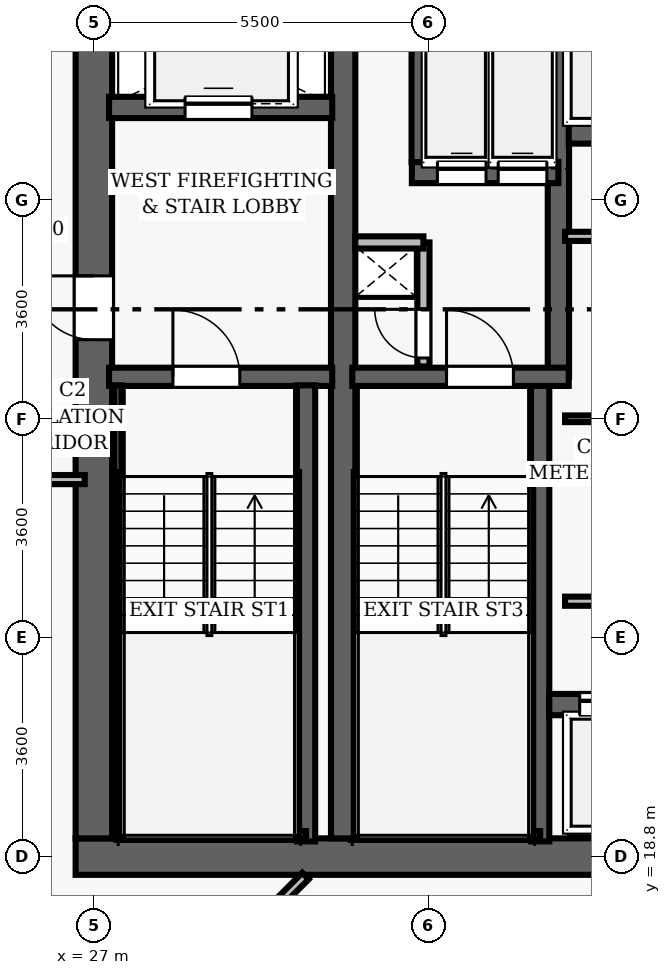
"""IFC4 building model, lengths in metres.
Left out: names, types, materials, properties, quantities, classifications, styles, units other than length and angle.
Written with IfcOpenShell. Run it as: python <this file> out.ifc"""

import sys

from ifc_helpers import new_model, si_unit, direction, frame, frame_2d, origin, place, context, subcontext, project, spatial, rectangle, extrude, element, fill, save


model = new_model("IFC4")
c1 = context("Model", 3, precision=1e-05, world=origin(), true_north=direction((0.0, 1.0)))
c2 = subcontext(c1, "Body", "Model", "MODEL_VIEW")
j1 = project(units=[si_unit("LENGTHUNIT", "METRE"), si_unit("PLANEANGLEUNIT", "RADIAN")], contexts=[c1])
p1 = place(None, origin())
s1 = spatial("IfcSite", under=j1, at=p1, CompositionType="ELEMENT")
p2 = place(p1, origin())
s2 = spatial("IfcBuilding", under=s1, at=p2, CompositionType="ELEMENT")
p3 = place(p2, frame((0.0, 0.0, 102.8)))
s3 = spatial("IfcBuildingStorey", under=s2, at=p3, CompositionType="ELEMENT", Elevation=102.8)
p4 = place(p3, frame((26.7, 18.8, 0.0), z_axis=(0.0, 0.0, 1.0), x_axis=(1.0, 0.0, 0.0)))
e1 = element("IfcWall", 1, at=p4, inside=s3, PredefinedType="SHEAR", context=c2, shape_type="SweptSolid", body=[
    extrude(rectangle(XDim=22.6, YDim=0.6, at=frame_2d((11.3, 0.0))), origin(), (0.0, 0.0, 1.0), 3.5),
])
p5 = place(p4, frame((14.52, 0.0, 0.0)))
e2 = element("IfcOpeningElement", 2, at=p5, cuts=e1, PredefinedType="OPENING", context=c2, shape_type="SweptSolid", body=[
    extrude(rectangle(XDim=1.05, YDim=2.15, at=frame_2d((0.525, 1.075))), frame((0.0, 0.31, 0.0), z_axis=(0.0, -1.0, 0.0), x_axis=(1.0, 0.0, 0.0)), (0.0, 0.0, 1.0), 0.62),
])
p6 = place(p3, frame((27.0, 19.1, 0.0), z_axis=(0.0, 0.0, 1.0), x_axis=(0.0, 1.0, 0.0)))
e3 = element("IfcWall", 3, at=p6, inside=s3, PredefinedType="SHEAR", context=c2, shape_type="SweptSolid", body=[
    extrude(rectangle(XDim=13.8, YDim=0.6, at=frame_2d((6.9, 0.0))), origin(), (0.0, 0.0, 1.0), 3.5),
])
p7 = place(p6, frame((8.2, 0.0, 0.0)))
e4 = element("IfcOpeningElement", 4, at=p7, cuts=e3, PredefinedType="OPENING", context=c2, shape_type="SweptSolid", body=[
    extrude(rectangle(XDim=1.05, YDim=2.15, at=frame_2d((0.525, 1.075))), frame((0.0, 0.31, 0.0), z_axis=(0.0, -1.0, 0.0), x_axis=(1.0, 0.0, 0.0)), (0.0, 0.0, 1.0), 0.62),
])
p8 = place(p3, frame((31.1, 19.1, 0.0), z_axis=(0.0, 0.0, 1.0), x_axis=(0.0, 1.0, 0.0)))
e5 = element("IfcWall", 5, at=p8, inside=s3, PredefinedType="SHEAR", context=c2, shape_type="SweptSolid", body=[
    extrude(rectangle(XDim=13.8, YDim=0.4, at=frame_2d((6.9, 0.0))), origin(), (0.0, 0.0, 1.0), 3.5),
])
p9 = place(p3, frame((27.25, 26.69, 0.0), z_axis=(0.0, 0.0, 1.0), x_axis=(1.0, 0.0, 0.0)))
e6 = element("IfcWall", 6, at=p9, inside=s3, PredefinedType="SHEAR", context=c2, shape_type="SweptSolid", body=[
    extrude(rectangle(XDim=3.67, YDim=0.3, at=frame_2d((1.835, 0.0))), origin(), (0.0, 0.0, 1.0), 3.5),
])
p10 = place(p9, frame((1.05, 0.0, 0.0)))
e7 = element("IfcOpeningElement", 7, at=p10, cuts=e6, PredefinedType="OPENING", context=c2, shape_type="SweptSolid", body=[
    extrude(rectangle(XDim=1.1, YDim=2.15, at=frame_2d((0.55, 1.075))), frame((0.0, 0.16, 0.0), z_axis=(0.0, -1.0, 0.0), x_axis=(1.0, 0.0, 0.0)), (0.0, 0.0, 1.0), 0.32),
])
p11 = place(p3, frame((30.49, 19.05, 0.0), z_axis=(0.0, 0.0, 1.0), x_axis=(0.0, 1.0, 0.0)))
e8 = element("IfcWall", 8, at=p11, inside=s3, PredefinedType="SHEAR", context=c2, shape_type="SweptSolid", body=[
    extrude(rectangle(XDim=7.5, YDim=0.3, at=frame_2d((3.75, 0.0))), origin(), (0.0, 0.0, 1.0), 3.5),
])
p12 = place(p3, frame((27.395, 19.1, 0.0), z_axis=(0.0, 0.0, 1.0), x_axis=(0.0, 1.0, 0.0)))
e9 = element("IfcWall", 9, at=p12, inside=s3, PredefinedType="SHEAR", context=c2, shape_type="SweptSolid", body=[
    extrude(rectangle(XDim=7.45, YDim=0.12, at=frame_2d((3.725, 0.0))), origin(), (0.0, 0.0, 1.0), 3.5),
])
p13 = place(p3, frame((27.395, 19.16, 0.0), z_axis=(0.0, 0.0, 1.0), x_axis=(1.0, 0.0, 0.0)))
e10 = element("IfcWall", 10, at=p13, inside=s3, PredefinedType="SHEAR", context=c2, shape_type="SweptSolid", body=[
    extrude(rectangle(XDim=3.095, YDim=0.12, at=frame_2d((1.547, 0.0))), origin(), (0.0, 0.0, 1.0), 3.5),
])
p14 = place(p3, frame((27.25, 31.12, 0.0), z_axis=(0.0, 0.0, 1.0), x_axis=(1.0, 0.0, 0.0)))
e11 = element("IfcWall", 11, at=p14, inside=s3, PredefinedType="SHEAR", context=c2, shape_type="SweptSolid", body=[
    extrude(rectangle(XDim=3.67, YDim=0.35, at=frame_2d((1.835, 0.0))), origin(), (0.0, 0.0, 1.0), 2.675),
])
p15 = place(p14, frame((1.25, 0.0, 0.0)))
e12 = element("IfcOpeningElement", 12, at=p15, cuts=e11, PredefinedType="OPENING", context=c2, shape_type="SweptSolid", body=[
    extrude(rectangle(XDim=1.1, YDim=2.15, at=frame_2d((0.55, 1.075))), frame((0.0, 0.185, 0.0), z_axis=(0.0, -1.0, 0.0), x_axis=(1.0, 0.0, 0.0)), (0.0, 0.0, 1.0), 0.37),
])
p16 = place(p3, frame((34.34, 19.05, 0.0), z_axis=(0.0, 0.0, 1.0), x_axis=(0.0, 1.0, 0.0)))
e13 = element("IfcWall", 13, at=p16, inside=s3, PredefinedType="SHEAR", context=c2, shape_type="SweptSolid", body=[
    extrude(rectangle(XDim=7.5, YDim=0.3, at=frame_2d((3.75, 0.0))), origin(), (0.0, 0.0, 1.0), 3.5),
])
p17 = place(p3, frame((34.64, 26.69, 0.0), z_axis=(0.0, 0.0, 1.0), x_axis=(0.0, 1.0, 0.0)))
e14 = element("IfcWall", 14, at=p17, inside=s3, PredefinedType="SHEAR", context=c2, shape_type="SweptSolid", body=[
    extrude(rectangle(XDim=6.26, YDim=0.35, at=frame_2d((3.13, 0.0))), origin(), (0.0, 0.0, 1.0), 3.5),
])
p18 = place(p3, frame((31.25, 26.69, 0.0), z_axis=(0.0, 0.0, 1.0), x_axis=(1.0, 0.0, 0.0)))
e15 = element("IfcWall", 15, at=p18, inside=s3, PredefinedType="SHEAR", context=c2, shape_type="SweptSolid", body=[
    extrude(rectangle(XDim=3.56, YDim=0.3, at=frame_2d((1.78, 0.0))), origin(), (0.0, 0.0, 1.0), 3.5),
])
p19 = place(p18, frame((1.55, 0.0, 0.0)))
e16 = element("IfcOpeningElement", 16, at=p19, cuts=e15, PredefinedType="OPENING", context=c2, shape_type="SweptSolid", body=[
    extrude(rectangle(XDim=1.1, YDim=2.15, at=frame_2d((0.55, 1.075))), frame((0.0, 0.16, 0.0), z_axis=(0.0, -1.0, 0.0), x_axis=(1.0, 0.0, 0.0)), (0.0, 0.0, 1.0), 0.32),
])
p20 = place(p3, frame((31.3, 19.16, 0.0), z_axis=(0.0, 0.0, 1.0), x_axis=(1.0, 0.0, 0.0)))
e17 = element("IfcWall", 17, at=p20, inside=s3, PredefinedType="SHEAR", context=c2, shape_type="SweptSolid", body=[
    extrude(rectangle(XDim=3.04, YDim=0.12, at=frame_2d((1.52, 0.0))), origin(), (0.0, 0.0, 1.0), 3.5),
])
p21 = place(p3, frame((32.23, 30.05, 0.0), z_axis=(0.0, 0.0, 1.0), x_axis=(1.0, 0.0, 0.0)))
e18 = element("IfcWall", 18, at=p21, inside=s3, PredefinedType="SHEAR", context=c2, shape_type="SweptSolid", body=[
    extrude(rectangle(XDim=2.41, YDim=0.35, at=frame_2d((1.205, 0.0))), origin(), (0.0, 0.0, 1.0), 2.675),
])
p22 = place(p21, frame((0.42, 0.0, 0.0)))
e19 = element("IfcOpeningElement", 19, at=p22, cuts=e18, PredefinedType="OPENING", context=c2, shape_type="SweptSolid", body=[
    extrude(rectangle(XDim=0.8, YDim=2.15, at=frame_2d((0.4, 1.075))), frame((0.0, 0.185, 0.0), z_axis=(0.0, -1.0, 0.0), x_axis=(1.0, 0.0, 0.0)), (0.0, 0.0, 1.0), 0.37),
])
p23 = place(p21, frame((1.42, 0.0, 0.0)))
e20 = element("IfcOpeningElement", 20, at=p23, cuts=e18, PredefinedType="OPENING", context=c2, shape_type="SweptSolid", body=[
    extrude(rectangle(XDim=0.8, YDim=2.15, at=frame_2d((0.4, 1.075))), frame((0.0, 0.185, 0.0), z_axis=(0.0, -1.0, 0.0), x_axis=(1.0, 0.0, 0.0)), (0.0, 0.0, 1.0), 0.37),
])
p24 = place(p3, frame((32.4, 30.22, 0.0), z_axis=(0.0, 0.0, 1.0), x_axis=(0.0, 1.0, 0.0)))
e21 = element("IfcWall", 21, at=p24, inside=s3, PredefinedType="SHEAR", context=c2, shape_type="SweptSolid", body=[
    extrude(rectangle(XDim=2.73, YDim=0.35, at=frame_2d((1.365, 0.0))), origin(), (0.0, 0.0, 1.0), 2.675),
])
p25 = place(p3, frame((32.42, 26.86, 0.0), z_axis=(0.0, 0.0, 1.0), x_axis=(0.0, 1.0, 0.0)))
e22 = element("IfcWall", 22, at=p25, inside=s3, PredefinedType="PARTITIONING", context=c2, shape_type="SweptSolid", body=[
    extrude(rectangle(XDim=2.04, YDim=0.2, at=frame_2d((1.02, 0.0))), origin(), (0.0, 0.0, 1.0), 2.675),
])
p26 = place(p25, frame((0.14, 0.0, 0.0)))
e23 = element("IfcOpeningElement", 23, at=p26, cuts=e22, PredefinedType="OPENING", context=c2, shape_type="SweptSolid", body=[
    extrude(rectangle(XDim=0.8, YDim=2.05, at=frame_2d((0.4, 1.025))), frame((0.0, 0.11, 0.0), z_axis=(0.0, -1.0, 0.0), x_axis=(1.0, 0.0, 0.0)), (0.0, 0.0, 1.0), 0.22),
])
p27 = place(p3, frame((31.3, 28.9, 0.0), z_axis=(0.0, 0.0, 1.0), x_axis=(1.0, 0.0, 0.0)))
e24 = element("IfcWall", 24, at=p27, inside=s3, PredefinedType="PARTITIONING", context=c2, shape_type="SweptSolid", body=[
    extrude(rectangle(XDim=1.12, YDim=0.2, at=frame_2d((0.56, 0.0))), origin(), (0.0, 0.0, 1.0), 2.675),
])
p28 = place(p3, frame((34.81, 30.7, 0.0), z_axis=(0.0, 0.0, 1.0), x_axis=(1.0, 0.0, 0.0)))
e25 = element("IfcWall", 25, at=p28, inside=s3, PredefinedType="SHEAR", context=c2, shape_type="SweptSolid", body=[
    extrude(rectangle(XDim=6.36, YDim=0.35, at=frame_2d((3.18, 0.0))), origin(), (0.0, 0.0, 1.0), 2.675),
])
p29 = place(p28, frame((0.5, 0.0, 0.0)))
e26 = element("IfcOpeningElement", 26, at=p29, cuts=e25, PredefinedType="OPENING", context=c2, shape_type="SweptSolid", body=[
    extrude(rectangle(XDim=0.9, YDim=2.15, at=frame_2d((0.45, 1.075))), frame((0.0, 0.185, 0.0), z_axis=(0.0, -1.0, 0.0), x_axis=(1.0, 0.0, 0.0)), (0.0, 0.0, 1.0), 0.37),
])
p30 = place(p28, frame((2.58, 0.0, 0.0)))
e27 = element("IfcOpeningElement", 27, at=p30, cuts=e25, PredefinedType="OPENING", context=c2, shape_type="SweptSolid", body=[
    extrude(rectangle(XDim=0.9, YDim=2.15, at=frame_2d((0.45, 1.075))), frame((0.0, 0.185, 0.0), z_axis=(0.0, -1.0, 0.0), x_axis=(1.0, 0.0, 0.0)), (0.0, 0.0, 1.0), 0.37),
])
p31 = place(p28, frame((4.66, 0.0, 0.0)))
e28 = element("IfcOpeningElement", 28, at=p31, cuts=e25, PredefinedType="OPENING", context=c2, shape_type="SweptSolid", body=[
    extrude(rectangle(XDim=0.9, YDim=2.15, at=frame_2d((0.45, 1.075))), frame((0.0, 0.185, 0.0), z_axis=(0.0, -1.0, 0.0), x_axis=(1.0, 0.0, 0.0)), (0.0, 0.0, 1.0), 0.37),
])
p32 = place(p3, frame((34.49, 21.3, 0.0), z_axis=(0.0, 0.0, 1.0), x_axis=(1.0, 0.0, 0.0)))
e29 = element("IfcWall", 29, at=p32, inside=s3, PredefinedType="SHEAR", context=c2, shape_type="SweptSolid", body=[
    extrude(rectangle(XDim=6.68, YDim=0.35, at=frame_2d((3.34, 0.0))), origin(), (0.0, 0.0, 1.0), 2.675),
])
p33 = place(p32, frame((0.5, 0.0, 0.0)))
e30 = element("IfcOpeningElement", 30, at=p33, cuts=e29, PredefinedType="OPENING", context=c2, shape_type="SweptSolid", body=[
    extrude(rectangle(XDim=0.9, YDim=2.15, at=frame_2d((0.45, 1.075))), frame((0.0, 0.185, 0.0), z_axis=(0.0, -1.0, 0.0), x_axis=(1.0, 0.0, 0.0)), (0.0, 0.0, 1.0), 0.37),
])
p34 = place(p32, frame((2.58, 0.0, 0.0)))
e31 = element("IfcOpeningElement", 31, at=p34, cuts=e29, PredefinedType="OPENING", context=c2, shape_type="SweptSolid", body=[
    extrude(rectangle(XDim=0.9, YDim=2.15, at=frame_2d((0.45, 1.075))), frame((0.0, 0.185, 0.0), z_axis=(0.0, -1.0, 0.0), x_axis=(1.0, 0.0, 0.0)), (0.0, 0.0, 1.0), 0.37),
])
p35 = place(p32, frame((4.66, 0.0, 0.0)))
e32 = element("IfcOpeningElement", 32, at=p35, cuts=e29, PredefinedType="OPENING", context=c2, shape_type="SweptSolid", body=[
    extrude(rectangle(XDim=0.9, YDim=2.15, at=frame_2d((0.45, 1.075))), frame((0.0, 0.185, 0.0), z_axis=(0.0, -1.0, 0.0), x_axis=(1.0, 0.0, 0.0)), (0.0, 0.0, 1.0), 0.37),
])
for number, where, z_axis, x_axis in (
    (33, (34.75, 29.0, 0.0), (0.0, 0.0, 1.0), (1.0, 0.0, 0.0)),
    (34, (34.75, 23.0, 0.0), (0.0, 0.0, 1.0), (1.0, 0.0, 0.0)),
):
    element("IfcWall", number, at=place(p3, frame(where, z_axis=z_axis, x_axis=x_axis)), inside=s3, PredefinedType="PARTITIONING", context=c2, shape_type="SweptSolid", body=[
        extrude(rectangle(XDim=6.25, YDim=0.15, at=frame_2d((3.125, 0.0))), origin(), (0.0, 0.0, 1.0), 2.675),
    ])
p36 = place(p3, frame((34.75, 26.0, 0.0), z_axis=(0.0, 0.0, 1.0), x_axis=(1.0, 0.0, 0.0)))
e35 = element("IfcWall", 35, at=p36, inside=s3, PredefinedType="PARTITIONING", context=c2, shape_type="SweptSolid", body=[
    extrude(rectangle(XDim=6.25, YDim=0.11, at=frame_2d((3.125, 0.0))), origin(), (0.0, 0.0, 1.0), 2.675),
])
p37 = place(p3, frame((14.5, 25.0, 0.0), z_axis=(0.0, 0.0, 1.0), x_axis=(1.0, 0.0, 0.0)))
e36 = element("IfcWall", 36, at=p37, inside=s3, PredefinedType="PARTITIONING", context=c2, shape_type="SweptSolid", body=[
    extrude(rectangle(XDim=12.35, YDim=0.15, at=frame_2d((6.175, 0.0))), origin(), (0.0, 0.0, 1.0), 2.675),
])
p38 = place(p37, frame((8.788, 0.0, 0.0)))
e37 = element("IfcOpeningElement", 37, at=p38, cuts=e36, PredefinedType="OPENING", context=c2, shape_type="SweptSolid", body=[
    extrude(rectangle(XDim=0.95, YDim=2.15, at=frame_2d((0.475, 1.075))), frame((0.0, 0.085, 0.0), z_axis=(0.0, -1.0, 0.0), x_axis=(1.0, 0.0, 0.0)), (0.0, 0.0, 1.0), 0.17),
])
p39 = place(p3, frame((30.48, 18.48, 0.0), z_axis=(0.0, 0.0, 1.0), x_axis=(-0.707106781187, -0.707106781187, 0.0)))
e38 = element("IfcWall", 38, at=p39, inside=s3, PredefinedType="PARTITIONING", context=c2, shape_type="SweptSolid", body=[
    extrude(rectangle(XDim=12.518, YDim=0.15, at=frame_2d((6.259, 0.0))), origin(), (0.0, 0.0, 1.0), 2.675),
])
p40 = place(p10, origin())
e39 = element("IfcDoor", 39, at=p40, inside=s3, OperationType="SINGLE_SWING_LEFT", PredefinedType="DOOR", context=c2, shape_type="SweptSolid", body=[
    extrude(rectangle(XDim=1.1, YDim=2.15, at=frame_2d((0.55, 1.075))), frame((0.0, 0.025, 0.0), z_axis=(0.0, -1.0, 0.0), x_axis=(1.0, 0.0, 0.0)), (0.0, 0.0, 1.0), 0.05),
])
fill(e7, e39)
p41 = place(p7, origin())
e40 = element("IfcDoor", 40, at=p41, inside=s3, OperationType="SINGLE_SWING_RIGHT", PredefinedType="DOOR", context=c2, shape_type="SweptSolid", body=[
    extrude(rectangle(XDim=1.05, YDim=2.15, at=frame_2d((0.525, 1.075))), frame((0.0, 0.025, 0.0), z_axis=(0.0, -1.0, 0.0), x_axis=(1.0, 0.0, 0.0)), (0.0, 0.0, 1.0), 0.05),
])
fill(e4, e40)
p42 = place(p19, origin())
e41 = element("IfcDoor", 41, at=p42, inside=s3, OperationType="SINGLE_SWING_LEFT", PredefinedType="DOOR", context=c2, shape_type="SweptSolid", body=[
    extrude(rectangle(XDim=1.1, YDim=2.15, at=frame_2d((0.55, 1.075))), frame((0.0, 0.025, 0.0), z_axis=(0.0, -1.0, 0.0), x_axis=(1.0, 0.0, 0.0)), (0.0, 0.0, 1.0), 0.05),
])
fill(e16, e41)
p43 = place(p26, origin())
e42 = element("IfcDoor", 42, at=p43, inside=s3, OperationType="SINGLE_SWING_RIGHT", PredefinedType="DOOR", context=c2, shape_type="SweptSolid", body=[
    extrude(rectangle(XDim=0.8, YDim=2.05, at=frame_2d((0.4, 1.025))), frame((0.0, 0.025, 0.0), z_axis=(0.0, -1.0, 0.0), x_axis=(1.0, 0.0, 0.0)), (0.0, 0.0, 1.0), 0.05),
])
fill(e23, e42)
p44 = place(p33, origin())
e43 = element("IfcDoor", 43, at=p44, inside=s3, OperationType="SLIDING_TO_LEFT", PredefinedType="DOOR", context=c2, shape_type="SweptSolid", body=[
    extrude(rectangle(XDim=0.9, YDim=2.15, at=frame_2d((0.45, 1.075))), frame((0.0, 0.025, 0.0), z_axis=(0.0, -1.0, 0.0), x_axis=(1.0, 0.0, 0.0)), (0.0, 0.0, 1.0), 0.05),
])
fill(e30, e43)
p45 = place(p15, origin())
e44 = element("IfcDoor", 44, at=p45, inside=s3, OperationType="SLIDING_TO_LEFT", PredefinedType="DOOR", context=c2, shape_type="SweptSolid", body=[
    extrude(rectangle(XDim=1.1, YDim=2.15, at=frame_2d((0.55, 1.075))), frame((0.0, 0.025, 0.0), z_axis=(0.0, -1.0, 0.0), x_axis=(1.0, 0.0, 0.0)), (0.0, 0.0, 1.0), 0.05),
])
fill(e12, e44)
p46 = place(p22, origin())
e45 = element("IfcDoor", 45, at=p46, inside=s3, OperationType="SLIDING_TO_LEFT", PredefinedType="DOOR", context=c2, shape_type="SweptSolid", body=[
    extrude(rectangle(XDim=0.8, YDim=2.15, at=frame_2d((0.4, 1.075))), frame((0.0, 0.025, 0.0), z_axis=(0.0, -1.0, 0.0), x_axis=(1.0, 0.0, 0.0)), (0.0, 0.0, 1.0), 0.05),
])
fill(e19, e45)
p47 = place(p23, origin())
e46 = element("IfcDoor", 46, at=p47, inside=s3, OperationType="SLIDING_TO_LEFT", PredefinedType="DOOR", context=c2, shape_type="SweptSolid", body=[
    extrude(rectangle(XDim=0.8, YDim=2.15, at=frame_2d((0.4, 1.075))), frame((0.0, 0.025, 0.0), z_axis=(0.0, -1.0, 0.0), x_axis=(1.0, 0.0, 0.0)), (0.0, 0.0, 1.0), 0.05),
])
fill(e20, e46)
save(model, sys.argv[1])
